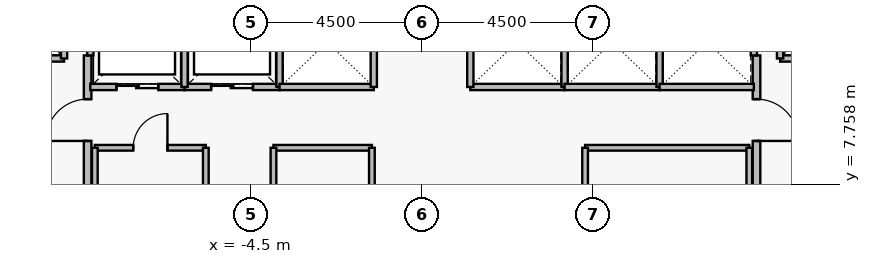
"""IFC4 building model, lengths in metres.
Left out: names, types, materials, properties, quantities, classifications, styles, units other than length and angle.
Written with IfcOpenShell. Run it as: python <this file> out.ifc"""

import sys

from ifc_helpers import new_model, si_unit, direction, frame, frame_2d, origin, place, context, subcontext, project, spatial, rectangle, extrude, element, fill, save


model = new_model("IFC4")
c1 = context("Model", 3, precision=1e-05, world=origin(), true_north=direction((0.0, 1.0)))
c2 = subcontext(c1, "Body", "Model", "MODEL_VIEW")
j1 = project(units=[si_unit("LENGTHUNIT", "METRE"), si_unit("PLANEANGLEUNIT", "RADIAN")], contexts=[c1])
p1 = place(None, origin())
s1 = spatial("IfcSite", under=j1, at=p1, CompositionType="ELEMENT")
p2 = place(p1, origin())
s2 = spatial("IfcBuilding", under=s1, at=p2, CompositionType="ELEMENT")
p3 = place(p2, frame((0.0, 0.0, 132.15)))
s3 = spatial("IfcBuildingStorey", under=s2, at=p3, CompositionType="ELEMENT", Elevation=132.15)
p4 = place(p3, frame((-8.8, 5.05, 0.0), z_axis=(0.0, 0.0, 1.0), x_axis=(0.0, 1.0, 0.0)))
e1 = element("IfcWall", 1, at=p4, inside=s3, PredefinedType="PARTITIONING", context=c2, shape_type="SweptSolid", body=[
    extrude(rectangle(XDim=6.1, YDim=0.2, at=frame_2d((3.05, 0.0))), origin(), (0.0, 0.0, 1.0), 3.43),
])
p5 = place(p4, frame((0.25, 0.0, 0.0)))
e2 = element("IfcOpeningElement", 2, at=p5, cuts=e1, PredefinedType="OPENING", context=c2, shape_type="SweptSolid", body=[
    extrude(rectangle(XDim=1.1, YDim=2.2, at=frame_2d((0.55, 1.1))), frame((0.0, 0.11, 0.0), z_axis=(0.0, -1.0, 0.0), x_axis=(1.0, 0.0, 0.0)), (0.0, 0.0, 1.0), 0.22),
])
p6 = place(p4, frame((3.85, 0.0, 0.0)))
e3 = element("IfcOpeningElement", 3, at=p6, cuts=e1, PredefinedType="OPENING", context=c2, shape_type="SweptSolid", body=[
    extrude(rectangle(XDim=1.1, YDim=2.2, at=frame_2d((0.55, 1.1))), frame((0.0, 0.11, 0.0), z_axis=(0.0, -1.0, 0.0), x_axis=(1.0, 0.0, 0.0)), (0.0, 0.0, 1.0), 0.22),
])
p7 = place(p3, frame((8.8, 11.15, 0.0), z_axis=(0.0, 0.0, 1.0), x_axis=(0.0, -1.0, 0.0)))
e4 = element("IfcWall", 4, at=p7, inside=s3, PredefinedType="PARTITIONING", context=c2, shape_type="SweptSolid", body=[
    extrude(rectangle(XDim=6.1, YDim=0.2, at=frame_2d((3.05, 0.0))), origin(), (0.0, 0.0, 1.0), 3.43),
])
p8 = place(p7, frame((1.15, 0.0, 0.0)))
e5 = element("IfcOpeningElement", 5, at=p8, cuts=e4, PredefinedType="OPENING", context=c2, shape_type="SweptSolid", body=[
    extrude(rectangle(XDim=1.1, YDim=2.2, at=frame_2d((0.55, 1.1))), frame((0.0, 0.11, 0.0), z_axis=(0.0, -1.0, 0.0), x_axis=(1.0, 0.0, 0.0)), (0.0, 0.0, 1.0), 0.22),
])
p9 = place(p7, frame((4.75, 0.0, 0.0)))
e6 = element("IfcOpeningElement", 6, at=p9, cuts=e4, PredefinedType="OPENING", context=c2, shape_type="SweptSolid", body=[
    extrude(rectangle(XDim=1.1, YDim=2.2, at=frame_2d((0.55, 1.1))), frame((0.0, 0.11, 0.0), z_axis=(0.0, -1.0, 0.0), x_axis=(1.0, 0.0, 0.0)), (0.0, 0.0, 1.0), 0.22),
])
p10 = place(p3, frame((-11.58, 11.07, 0.0), z_axis=(0.0, 0.0, 1.0), x_axis=(1.0, 0.0, 0.0)))
e7 = element("IfcWall", 7, at=p10, inside=s3, PredefinedType="PARTITIONING", context=c2, shape_type="SweptSolid", body=[
    extrude(rectangle(XDim=2.16, YDim=0.165, at=frame_2d((1.08, 0.0))), origin(), (0.0, 0.0, 1.0), 3.43),
])
p11 = place(p10, frame((0.53, 0.0, 0.0)))
e8 = element("IfcOpeningElement", 8, at=p11, cuts=e7, PredefinedType="OPENING", context=c2, shape_type="SweptSolid", body=[
    extrude(rectangle(XDim=1.15, YDim=2.25, at=frame_2d((0.575, 1.125))), frame((0.0, 0.093, 0.0), z_axis=(0.0, -1.0, 0.0), x_axis=(1.0, 0.0, 0.0)), (0.0, 0.0, 1.0), 0.185),
])
p12 = place(p3, frame((9.42, 11.07, 0.0), z_axis=(0.0, 0.0, 1.0), x_axis=(1.0, 0.0, 0.0)))
e9 = element("IfcWall", 9, at=p12, inside=s3, PredefinedType="PARTITIONING", context=c2, shape_type="SweptSolid", body=[
    extrude(rectangle(XDim=2.16, YDim=0.165, at=frame_2d((1.08, 0.0))), origin(), (0.0, 0.0, 1.0), 3.43),
])
p13 = place(p12, frame((0.53, 0.0, 0.0)))
e10 = element("IfcOpeningElement", 10, at=p13, cuts=e9, PredefinedType="OPENING", context=c2, shape_type="SweptSolid", body=[
    extrude(rectangle(XDim=1.15, YDim=2.25, at=frame_2d((0.575, 1.125))), frame((0.0, 0.093, 0.0), z_axis=(0.0, -1.0, 0.0), x_axis=(1.0, 0.0, 0.0)), (0.0, 0.0, 1.0), 0.185),
])
p14 = place(p3, frame((-8.73, 10.32, 0.0), z_axis=(0.0, 0.0, 1.0), x_axis=(1.0, 0.0, 0.0)))
e11 = element("IfcWall", 11, at=p14, inside=s3, PredefinedType="PARTITIONING", context=c2, shape_type="SweptSolid", body=[
    extrude(rectangle(XDim=2.48, YDim=0.165, at=frame_2d((1.24, 0.0))), origin(), (0.0, 0.0, 1.0), 3.43),
])
p15 = place(p14, frame((0.69, 0.0, 0.0)))
e12 = element("IfcOpeningElement", 12, at=p15, cuts=e11, PredefinedType="OPENING", context=c2, shape_type="SweptSolid", body=[
    extrude(rectangle(XDim=1.1, YDim=2.25, at=frame_2d((0.55, 1.125))), frame((0.0, 0.093, 0.0), z_axis=(0.0, -1.0, 0.0), x_axis=(1.0, 0.0, 0.0)), (0.0, 0.0, 1.0), 0.185),
])
p16 = place(p3, frame((-6.25, 10.32, 0.0), z_axis=(0.0, 0.0, 1.0), x_axis=(1.0, 0.0, 0.0)))
e13 = element("IfcWall", 13, at=p16, inside=s3, PredefinedType="PARTITIONING", context=c2, shape_type="SweptSolid", body=[
    extrude(rectangle(XDim=2.5, YDim=0.165, at=frame_2d((1.25, 0.0))), origin(), (0.0, 0.0, 1.0), 3.43),
])
p17 = place(p16, frame((0.7, 0.0, 0.0)))
e14 = element("IfcOpeningElement", 14, at=p17, cuts=e13, PredefinedType="OPENING", context=c2, shape_type="SweptSolid", body=[
    extrude(rectangle(XDim=1.1, YDim=2.25, at=frame_2d((0.55, 1.125))), frame((0.0, 0.093, 0.0), z_axis=(0.0, -1.0, 0.0), x_axis=(1.0, 0.0, 0.0)), (0.0, 0.0, 1.0), 0.185),
])
p18 = place(p3, frame((-8.61, 8.72, 0.0), z_axis=(0.0, 0.0, 1.0), x_axis=(1.0, 0.0, 0.0)))
e15 = element("IfcWall", 15, at=p18, inside=s3, PredefinedType="PARTITIONING", context=c2, shape_type="SweptSolid", body=[
    extrude(rectangle(XDim=2.92, YDim=0.15, at=frame_2d((1.46, 0.0))), origin(), (0.0, 0.0, 1.0), 3.43),
])
p19 = place(p18, frame((1.01, 0.0, 0.0)))
e16 = element("IfcOpeningElement", 16, at=p19, cuts=e15, PredefinedType="OPENING", context=c2, shape_type="SweptSolid", body=[
    extrude(rectangle(XDim=0.9, YDim=2.15, at=frame_2d((0.45, 1.075))), frame((0.0, 0.085, 0.0), z_axis=(0.0, -1.0, 0.0), x_axis=(1.0, 0.0, 0.0)), (0.0, 0.0, 1.0), 0.17),
])
for number, where, z_axis, x_axis in (
    (17, (-9.42, 11.07, 0.0), (0.0, 0.0, 1.0), (0.0, 1.0, 0.0)),
    (18, (9.42, 11.07, 0.0), (0.0, 0.0, 1.0), (0.0, 1.0, 0.0)),
):
    element("IfcWall", number, at=place(p3, frame(where, z_axis=z_axis, x_axis=x_axis)), inside=s3, PredefinedType="PARTITIONING", context=c2, shape_type="SweptSolid", body=[
        extrude(rectangle(XDim=2.96, YDim=0.165, at=frame_2d((1.48, 0.0))), origin(), (0.0, 0.0, 1.0), 3.43),
    ])
p20 = place(p3, frame((-8.73, 11.15, 0.0), z_axis=(0.0, 0.0, 1.0), x_axis=(0.0, 1.0, 0.0)))
e19 = element("IfcWall", 19, at=p20, inside=s3, PredefinedType="PARTITIONING", context=c2, shape_type="SweptSolid", body=[
    extrude(rectangle(XDim=1.53, YDim=0.165, at=frame_2d((0.765, 0.0))), origin(), (0.0, 0.0, 1.0), 3.43),
])
for number, where, z_axis, x_axis in (
    (20, (-6.25, 10.32, 0.0), (0.0, 0.0, 1.0), (0.0, 1.0, 0.0)),
    (21, (-3.75, 10.32, 0.0), (0.0, 0.0, 1.0), (0.0, 1.0, 0.0)),
):
    element("IfcWall", number, at=place(p3, frame(where, z_axis=z_axis, x_axis=x_axis)), inside=s3, PredefinedType="PARTITIONING", context=c2, shape_type="SweptSolid", body=[
        extrude(rectangle(XDim=2.36, YDim=0.165, at=frame_2d((1.18, 0.0))), origin(), (0.0, 0.0, 1.0), 3.43),
    ])
p21 = place(p3, frame((-3.75, 10.32, 0.0), z_axis=(0.0, 0.0, 1.0), x_axis=(1.0, 0.0, 0.0)))
e22 = element("IfcWall", 22, at=p21, inside=s3, PredefinedType="PARTITIONING", context=c2, shape_type="SweptSolid", body=[
    extrude(rectangle(XDim=2.48, YDim=0.165, at=frame_2d((1.24, 0.0))), origin(), (0.0, 0.0, 1.0), 3.43),
])
p22 = place(p3, frame((-1.27, 10.32, 0.0), z_axis=(0.0, 0.0, 1.0), x_axis=(0.0, 1.0, 0.0)))
e23 = element("IfcWall", 23, at=p22, inside=s3, PredefinedType="PARTITIONING", context=c2, shape_type="SweptSolid", body=[
    extrude(rectangle(XDim=2.36, YDim=0.165, at=frame_2d((1.18, 0.0))), origin(), (0.0, 0.0, 1.0), 3.43),
])
p23 = place(p3, frame((1.27, 10.32, 0.0), z_axis=(0.0, 0.0, 1.0), x_axis=(1.0, 0.0, 0.0)))
e24 = element("IfcWall", 24, at=p23, inside=s3, PredefinedType="PARTITIONING", context=c2, shape_type="SweptSolid", body=[
    extrude(rectangle(XDim=2.48, YDim=0.165, at=frame_2d((1.24, 0.0))), origin(), (0.0, 0.0, 1.0), 3.43),
])
for number, where, z_axis, x_axis in (
    (25, (1.27, 10.32, 0.0), (0.0, 0.0, 1.0), (0.0, 1.0, 0.0)),
    (26, (3.75, 10.32, 0.0), (0.0, 0.0, 1.0), (0.0, 1.0, 0.0)),
):
    element("IfcWall", number, at=place(p3, frame(where, z_axis=z_axis, x_axis=x_axis)), inside=s3, PredefinedType="PARTITIONING", context=c2, shape_type="SweptSolid", body=[
        extrude(rectangle(XDim=2.36, YDim=0.165, at=frame_2d((1.18, 0.0))), origin(), (0.0, 0.0, 1.0), 3.43),
    ])
p24 = place(p3, frame((3.75, 10.32, 0.0), z_axis=(0.0, 0.0, 1.0), x_axis=(1.0, 0.0, 0.0)))
e27 = element("IfcWall", 27, at=p24, inside=s3, PredefinedType="PARTITIONING", context=c2, shape_type="SweptSolid", body=[
    extrude(rectangle(XDim=2.5, YDim=0.165, at=frame_2d((1.25, 0.0))), origin(), (0.0, 0.0, 1.0), 3.43),
])
p25 = place(p3, frame((6.25, 10.32, 0.0), z_axis=(0.0, 0.0, 1.0), x_axis=(0.0, 1.0, 0.0)))
e28 = element("IfcWall", 28, at=p25, inside=s3, PredefinedType="PARTITIONING", context=c2, shape_type="SweptSolid", body=[
    extrude(rectangle(XDim=2.36, YDim=0.165, at=frame_2d((1.18, 0.0))), origin(), (0.0, 0.0, 1.0), 3.43),
])
p26 = place(p3, frame((6.25, 10.32, 0.0), z_axis=(0.0, 0.0, 1.0), x_axis=(1.0, 0.0, 0.0)))
e29 = element("IfcWall", 29, at=p26, inside=s3, PredefinedType="PARTITIONING", context=c2, shape_type="SweptSolid", body=[
    extrude(rectangle(XDim=2.48, YDim=0.165, at=frame_2d((1.24, 0.0))), origin(), (0.0, 0.0, 1.0), 3.43),
])
p27 = place(p3, frame((8.73, 11.15, 0.0), z_axis=(0.0, 0.0, 1.0), x_axis=(0.0, 1.0, 0.0)))
e30 = element("IfcWall", 30, at=p27, inside=s3, PredefinedType="PARTITIONING", context=c2, shape_type="SweptSolid", body=[
    extrude(rectangle(XDim=1.53, YDim=0.165, at=frame_2d((0.765, 0.0))), origin(), (0.0, 0.0, 1.0), 3.43),
])
for number, where, z_axis, x_axis in (
    (31, (-8.61, 6.48, 0.0), (0.0, 0.0, 1.0), (0.0, 1.0, 0.0)),
    (32, (-5.69, 6.48, 0.0), (0.0, 0.0, 1.0), (0.0, 1.0, 0.0)),
):
    element("IfcWall", number, at=place(p3, frame(where, z_axis=z_axis, x_axis=x_axis)), inside=s3, PredefinedType="PARTITIONING", context=c2, shape_type="SweptSolid", body=[
        extrude(rectangle(XDim=2.24, YDim=0.15, at=frame_2d((1.12, 0.0))), origin(), (0.0, 0.0, 1.0), 3.43),
    ])
p28 = place(p3, frame((-3.91, 8.72, 0.0), z_axis=(0.0, 0.0, 1.0), x_axis=(1.0, 0.0, 0.0)))
e33 = element("IfcWall", 33, at=p28, inside=s3, PredefinedType="PARTITIONING", context=c2, shape_type="SweptSolid", body=[
    extrude(rectangle(XDim=2.59, YDim=0.15, at=frame_2d((1.295, 0.0))), origin(), (0.0, 0.0, 1.0), 3.43),
])
for number, where, z_axis, x_axis in (
    (34, (-3.91, 6.48, 0.0), (0.0, 0.0, 1.0), (0.0, 1.0, 0.0)),
    (35, (-1.32, 6.48, 0.0), (0.0, 0.0, 1.0), (0.0, 1.0, 0.0)),
):
    element("IfcWall", number, at=place(p3, frame(where, z_axis=z_axis, x_axis=x_axis)), inside=s3, PredefinedType="PARTITIONING", context=c2, shape_type="SweptSolid", body=[
        extrude(rectangle(XDim=2.24, YDim=0.15, at=frame_2d((1.12, 0.0))), origin(), (0.0, 0.0, 1.0), 3.43),
    ])
p29 = place(p3, frame((4.29, 8.72, 0.0), z_axis=(0.0, 0.0, 1.0), x_axis=(1.0, 0.0, 0.0)))
e36 = element("IfcWall", 36, at=p29, inside=s3, PredefinedType="PARTITIONING", context=c2, shape_type="SweptSolid", body=[
    extrude(rectangle(XDim=4.32, YDim=0.15, at=frame_2d((2.16, 0.0))), origin(), (0.0, 0.0, 1.0), 3.43),
])
for number, where, z_axis, x_axis in (
    (37, (4.29, 6.48, 0.0), (0.0, 0.0, 1.0), (0.0, 1.0, 0.0)),
    (38, (8.61, 6.48, 0.0), (0.0, 0.0, 1.0), (0.0, 1.0, 0.0)),
):
    element("IfcWall", number, at=place(p3, frame(where, z_axis=z_axis, x_axis=x_axis)), inside=s3, PredefinedType="PARTITIONING", context=c2, shape_type="SweptSolid", body=[
        extrude(rectangle(XDim=2.24, YDim=0.15, at=frame_2d((1.12, 0.0))), origin(), (0.0, 0.0, 1.0), 3.43),
    ])
p30 = place(p6, origin())
e39 = element("IfcDoor", 39, at=p30, inside=s3, OperationType="SINGLE_SWING_LEFT", PredefinedType="DOOR", context=c2, shape_type="SweptSolid", body=[
    extrude(rectangle(XDim=1.1, YDim=2.2, at=frame_2d((0.55, 1.1))), frame((0.0, 0.025, 0.0), z_axis=(0.0, -1.0, 0.0), x_axis=(1.0, 0.0, 0.0)), (0.0, 0.0, 1.0), 0.05),
])
fill(e3, e39)
p31 = place(p8, origin())
e40 = element("IfcDoor", 40, at=p31, inside=s3, OperationType="SINGLE_SWING_RIGHT", PredefinedType="DOOR", context=c2, shape_type="SweptSolid", body=[
    extrude(rectangle(XDim=1.1, YDim=2.2, at=frame_2d((0.55, 1.1))), frame((0.0, 0.025, 0.0), z_axis=(0.0, -1.0, 0.0), x_axis=(1.0, 0.0, 0.0)), (0.0, 0.0, 1.0), 0.05),
])
fill(e5, e40)
p32 = place(p15, origin())
e41 = element("IfcDoor", 41, at=p32, inside=s3, OperationType="SLIDING_TO_LEFT", PredefinedType="DOOR", context=c2, shape_type="SweptSolid", body=[
    extrude(rectangle(XDim=1.1, YDim=2.25, at=frame_2d((0.55, 1.125))), frame((0.0, 0.025, 0.0), z_axis=(0.0, -1.0, 0.0), x_axis=(1.0, 0.0, 0.0)), (0.0, 0.0, 1.0), 0.05),
])
fill(e12, e41)
p33 = place(p17, origin())
e42 = element("IfcDoor", 42, at=p33, inside=s3, OperationType="SLIDING_TO_LEFT", PredefinedType="DOOR", context=c2, shape_type="SweptSolid", body=[
    extrude(rectangle(XDim=1.1, YDim=2.25, at=frame_2d((0.55, 1.125))), frame((0.0, 0.025, 0.0), z_axis=(0.0, -1.0, 0.0), x_axis=(1.0, 0.0, 0.0)), (0.0, 0.0, 1.0), 0.05),
])
fill(e14, e42)
p34 = place(p19, origin())
e43 = element("IfcDoor", 43, at=p34, inside=s3, OperationType="SINGLE_SWING_RIGHT", PredefinedType="DOOR", context=c2, shape_type="SweptSolid", body=[
    extrude(rectangle(XDim=0.9, YDim=2.15, at=frame_2d((0.45, 1.075))), frame((0.0, 0.025, 0.0), z_axis=(0.0, -1.0, 0.0), x_axis=(1.0, 0.0, 0.0)), (0.0, 0.0, 1.0), 0.05),
])
fill(e16, e43)
save(model, sys.argv[1])
